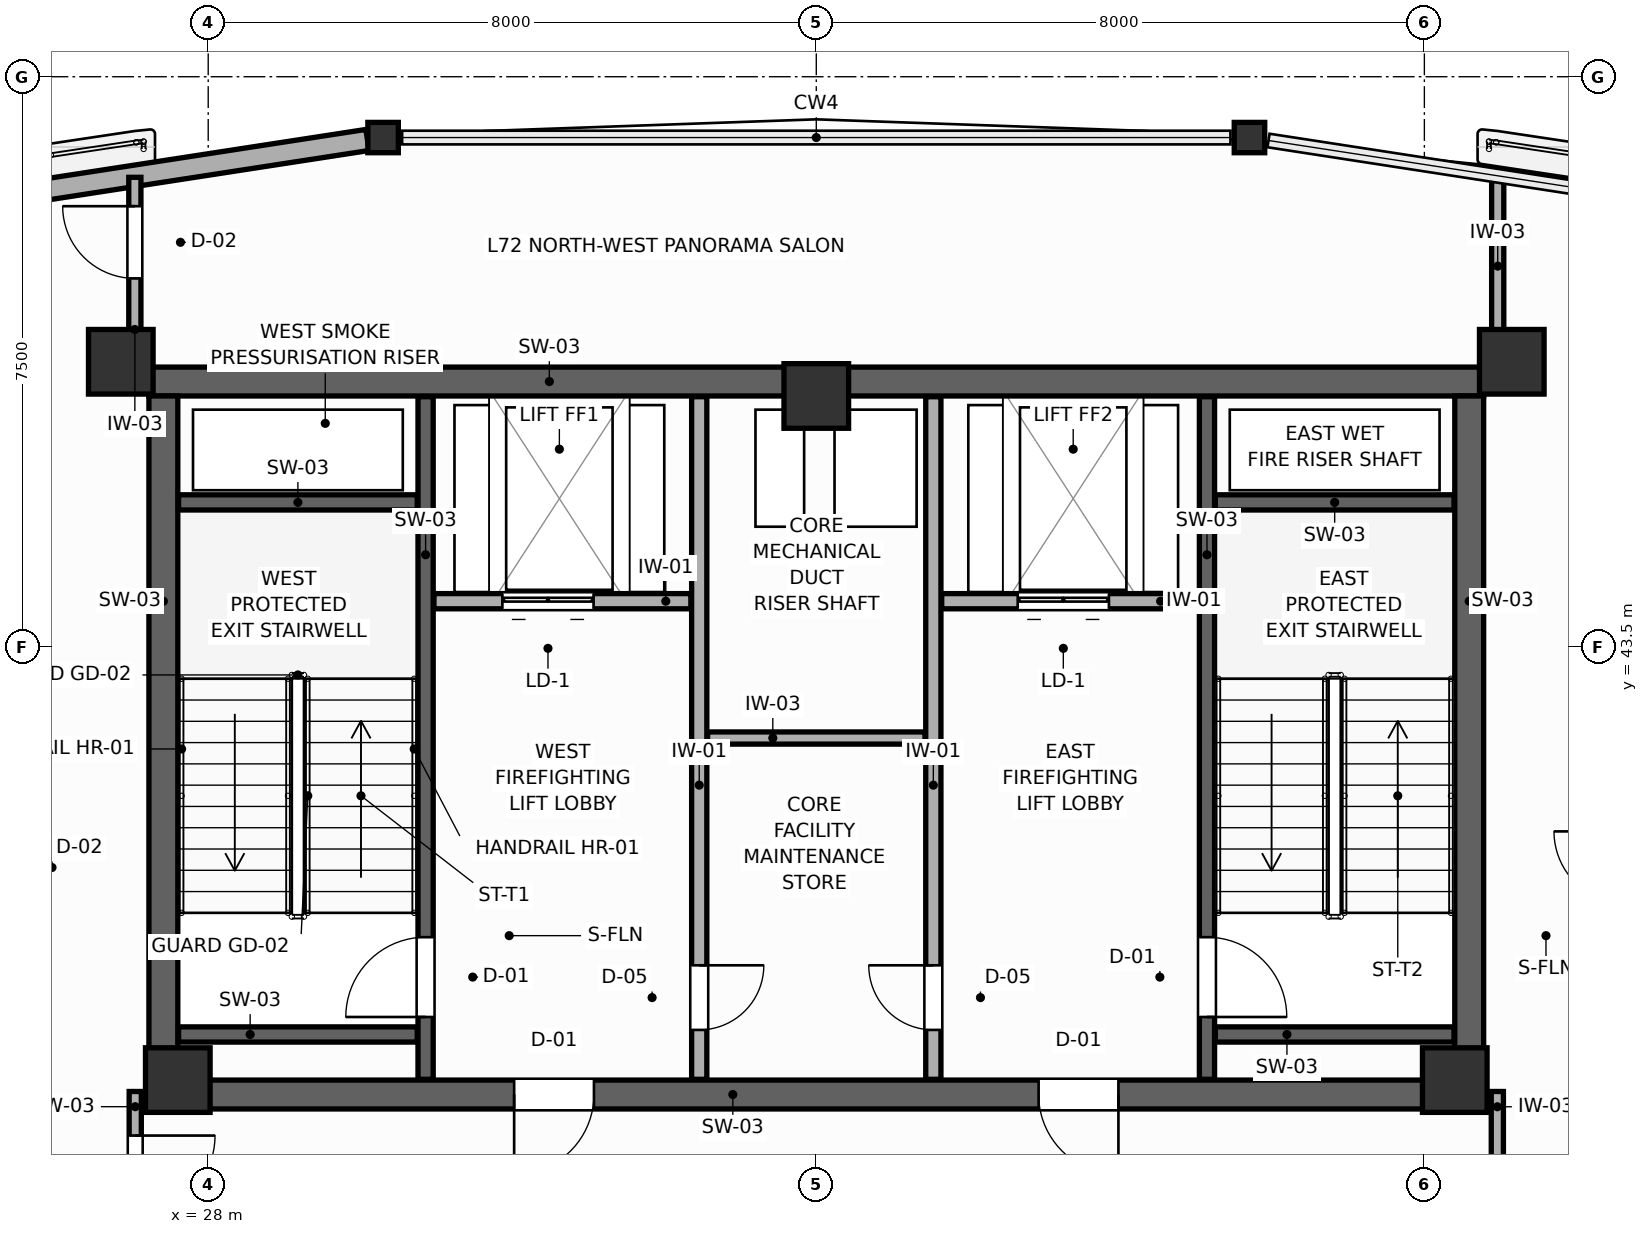
"""IFC4 building model, lengths in metres.
Left out: names, types, materials, properties, quantities, classifications, styles, units other than length and angle.
Written with IfcOpenShell. Run it as: python <this file> out.ifc"""

import sys

from ifc_helpers import new_model, si_unit, direction, frame, frame_2d, origin, origin_2d, place, context, subcontext, project, spatial, rectangle, i_section, extrude, source, transform, mapped, element, fill, save


model = new_model("IFC4")
c1 = context("Model", 3, precision=1e-05, world=origin(), true_north=direction((0.0, 1.0)))
c2 = subcontext(c1, "Body", "Model", "MODEL_VIEW")
j1 = project(units=[si_unit("LENGTHUNIT", "METRE"), si_unit("PLANEANGLEUNIT", "RADIAN")], contexts=[c1])
p1 = place(None, origin())
s1 = spatial("IfcSite", under=j1, at=p1, CompositionType="ELEMENT")
p2 = place(p1, origin())
s2 = spatial("IfcBuilding", under=s1, at=p2, CompositionType="ELEMENT")
p3 = place(p2, frame((0.0, 0.0, 275.4)))
s3 = spatial("IfcBuildingStorey", under=s2, at=p3, CompositionType="ELEMENT", Elevation=275.4)
p4 = place(p3, frame((27.22, 46.99, 0.0), z_axis=(0.0, 0.0, 1.0), x_axis=(1.0, 0.0, 0.0)))
e1 = element("IfcWall", 1, at=p4, inside=s3, PredefinedType="SHEAR", context=c2, shape_type="SweptSolid", body=[
    extrude(rectangle(XDim=17.56, YDim=0.38, at=frame_2d((8.78, 0.0))), origin(), (0.0, 0.0, 1.0), 4.2),
])
p5 = place(p3, frame((27.22, 37.61, 0.0), z_axis=(0.0, 0.0, 1.0), x_axis=(1.0, 0.0, 0.0)))
e2 = element("IfcWall", 2, at=p5, inside=s3, PredefinedType="SHEAR", context=c2, shape_type="SweptSolid", body=[
    extrude(rectangle(XDim=17.56, YDim=0.38, at=frame_2d((8.78, 0.0))), origin(), (0.0, 0.0, 1.0), 4.2),
])
p6 = place(p5, frame((4.805, 0.0, 0.0)))
e3 = element("IfcOpeningElement", 3, at=p6, cuts=e2, PredefinedType="OPENING", context=c2, shape_type="SweptSolid", body=[
    extrude(rectangle(XDim=1.05, YDim=2.1, at=frame_2d((0.525, 1.05))), frame((0.0, 0.2, 0.0), z_axis=(0.0, -1.0, 0.0), x_axis=(1.0, 0.0, 0.0)), (0.0, 0.0, 1.0), 0.4),
])
p7 = place(p5, frame((11.705, 0.0, 0.0)))
e4 = element("IfcOpeningElement", 4, at=p7, cuts=e2, PredefinedType="OPENING", context=c2, shape_type="SweptSolid", body=[
    extrude(rectangle(XDim=1.05, YDim=2.1, at=frame_2d((0.525, 1.05))), frame((0.0, 0.2, 0.0), z_axis=(0.0, -1.0, 0.0), x_axis=(1.0, 0.0, 0.0)), (0.0, 0.0, 1.0), 0.4),
])
for number, where, z_axis, x_axis in (
    (5, (27.41, 37.8, 0.0), (0.0, 0.0, 1.0), (0.0, 1.0, 0.0)),
    (6, (44.59, 37.8, 0.0), (0.0, 0.0, 1.0), (0.0, 1.0, 0.0)),
):
    element("IfcWall", number, at=place(p3, frame(where, z_axis=z_axis, x_axis=x_axis)), inside=s3, PredefinedType="SHEAR", context=c2, shape_type="SweptSolid", body=[
        extrude(rectangle(XDim=9.0, YDim=0.38, at=frame_2d((4.5, 0.0))), origin(), (0.0, 0.0, 1.0), 4.2),
    ])
m1 = source(origin(), c2, "Body", "SweptSolid", [
    extrude(rectangle(XDim=0.85, YDim=0.85, at=origin_2d()), origin(), (0.0, 0.0, 1.0), 4.2),
])
for number, where, z_axis, x_axis in (
    (7, (26.85, 47.25, 0.0), (0.0, 0.0, 1.0), (1.0, 0.0, 0.0)),
    (8, (45.15, 47.25, 0.0), (0.0, 0.0, 1.0), (1.0, 0.0, 0.0)),
    (9, (27.6, 37.8, 0.0), (0.0, 0.0, 1.0), (1.0, 0.0, 0.0)),
    (10, (44.4, 37.8, 0.0), (0.0, 0.0, 1.0), (1.0, 0.0, 0.0)),
    (11, (36.0, 46.8, 0.0), (0.0, 0.0, 1.0), (1.0, 0.0, 0.0)),
):
    element("IfcColumn", number, at=place(p3, frame(where, z_axis=z_axis, x_axis=x_axis)), inside=s3, PredefinedType="COLUMN", context=c2, shape_type="MappedRepresentation", body=[
        mapped(m1, transform((0.0, 0.0, 0.0), scale=1.0)),
    ])
m2 = source(origin(), c2, "Body", "SweptSolid", [
    extrude(i_section(OverallWidth=0.401, OverallDepth=0.399, WebThickness=0.022, FlangeThickness=0.036, FilletRadius=0.015, at=origin_2d()), origin(), (0.0, 0.0, 1.0), 4.2),
])
for number, where, z_axis, x_axis in (
    (12, (41.699, 50.2, 0.0), (0.0, 0.0, 1.0), (1.0, 0.0, 0.0)),
    (13, (30.301, 50.2, 0.0), (0.0, 0.0, 1.0), (1.0, 0.0, 0.0)),
):
    element("IfcColumn", number, at=place(p3, frame(where, z_axis=z_axis, x_axis=x_axis)), inside=s3, PredefinedType="COLUMN", context=c2, shape_type="MappedRepresentation", body=[
        mapped(m2, transform((0.0, 0.0, 0.0), scale=1.0)),
    ])
p8 = place(p3, frame((30.095, 50.168, 0.0), z_axis=(0.0, 0.0, 1.0), x_axis=(-0.988345027655, -0.152230438186, 0.0)))
e14 = element("IfcWall", 14, at=p8, inside=s3, PredefinedType="SOLIDWALL", context=c2, shape_type="SweptSolid", body=[
    extrude(rectangle(XDim=12.601, YDim=0.28, at=frame_2d((6.3, 0.0))), origin(), (0.0, 0.0, 1.0), 2.52),
])
p9 = place(p3, frame((30.86, 37.81, 0.0), z_axis=(0.0, 0.0, 1.0), x_axis=(0.0, 1.0, 0.0)))
e15 = element("IfcWall", 15, at=p9, inside=s3, PredefinedType="SHEAR", context=c2, shape_type="SweptSolid", body=[
    extrude(rectangle(XDim=8.98, YDim=0.2, at=frame_2d((4.49, 0.0))), origin(), (0.0, 0.0, 1.0), 4.2),
])
p10 = place(p9, frame((0.82, 0.0, 0.0)))
e16 = element("IfcOpeningElement", 16, at=p10, cuts=e15, PredefinedType="OPENING", context=c2, shape_type="SweptSolid", body=[
    extrude(rectangle(XDim=1.05, YDim=2.1, at=frame_2d((0.525, 1.05))), frame((0.0, 0.11, 0.0), z_axis=(0.0, -1.0, 0.0), x_axis=(1.0, 0.0, 0.0)), (0.0, 0.0, 1.0), 0.22),
])
for number, where, z_axis, x_axis in (
    (17, (27.61, 45.4, 0.0), (0.0, 0.0, 1.0), (1.0, 0.0, 0.0)),
    (18, (27.61, 38.4, 0.0), (0.0, 0.0, 1.0), (1.0, 0.0, 0.0)),
):
    element("IfcWall", number, at=place(p3, frame(where, z_axis=z_axis, x_axis=x_axis)), inside=s3, PredefinedType="SHEAR", context=c2, shape_type="SweptSolid", body=[
        extrude(rectangle(XDim=3.14, YDim=0.2, at=frame_2d((1.57, 0.0))), origin(), (0.0, 0.0, 1.0), 4.2),
    ])
p11 = place(p3, frame((41.14, 37.81, 0.0), z_axis=(0.0, 0.0, 1.0), x_axis=(0.0, 1.0, 0.0)))
e19 = element("IfcWall", 19, at=p11, inside=s3, PredefinedType="SHEAR", context=c2, shape_type="SweptSolid", body=[
    extrude(rectangle(XDim=8.98, YDim=0.2, at=frame_2d((4.49, 0.0))), origin(), (0.0, 0.0, 1.0), 4.2),
])
p12 = place(p11, frame((0.82, 0.0, 0.0)))
e20 = element("IfcOpeningElement", 20, at=p12, cuts=e19, PredefinedType="OPENING", context=c2, shape_type="SweptSolid", body=[
    extrude(rectangle(XDim=1.05, YDim=2.1, at=frame_2d((0.525, 1.05))), frame((0.0, 0.11, 0.0), z_axis=(0.0, -1.0, 0.0), x_axis=(1.0, 0.0, 0.0)), (0.0, 0.0, 1.0), 0.22),
])
for number, where, z_axis, x_axis in (
    (21, (41.25, 45.4, 0.0), (0.0, 0.0, 1.0), (1.0, 0.0, 0.0)),
    (22, (41.25, 38.4, 0.0), (0.0, 0.0, 1.0), (1.0, 0.0, 0.0)),
):
    element("IfcWall", number, at=place(p3, frame(where, z_axis=z_axis, x_axis=x_axis)), inside=s3, PredefinedType="SHEAR", context=c2, shape_type="SweptSolid", body=[
        extrude(rectangle(XDim=3.14, YDim=0.2, at=frame_2d((1.57, 0.0))), origin(), (0.0, 0.0, 1.0), 4.2),
    ])
p13 = place(p3, frame((30.97, 44.1, 0.0), z_axis=(0.0, 0.0, 1.0), x_axis=(1.0, 0.0, 0.0)))
e23 = element("IfcWall", 23, at=p13, inside=s3, PredefinedType="PARTITIONING", context=c2, shape_type="SweptSolid", body=[
    extrude(rectangle(XDim=3.38, YDim=0.2, at=frame_2d((1.69, 0.0))), origin(), (0.0, 0.0, 1.0), 3.96),
])
p14 = place(p13, frame((0.9, 0.0, 0.0)))
e24 = element("IfcOpeningElement", 24, at=p14, cuts=e23, PredefinedType="OPENING", context=c2, shape_type="SweptSolid", body=[
    extrude(rectangle(XDim=1.2, YDim=2.1, at=frame_2d((0.6, 1.05))), frame((0.0, 0.11, 0.0), z_axis=(0.0, -1.0, 0.0), x_axis=(1.0, 0.0, 0.0)), (0.0, 0.0, 1.0), 0.22),
])
p15 = place(p3, frame((37.65, 44.1, 0.0), z_axis=(0.0, 0.0, 1.0), x_axis=(1.0, 0.0, 0.0)))
e25 = element("IfcWall", 25, at=p15, inside=s3, PredefinedType="PARTITIONING", context=c2, shape_type="SweptSolid", body=[
    extrude(rectangle(XDim=3.38, YDim=0.2, at=frame_2d((1.69, 0.0))), origin(), (0.0, 0.0, 1.0), 3.96),
])
p16 = place(p15, frame((1.0, 0.0, 0.0)))
e26 = element("IfcOpeningElement", 26, at=p16, cuts=e25, PredefinedType="OPENING", context=c2, shape_type="SweptSolid", body=[
    extrude(rectangle(XDim=1.2, YDim=2.1, at=frame_2d((0.6, 1.05))), frame((0.0, 0.11, 0.0), z_axis=(0.0, -1.0, 0.0), x_axis=(1.0, 0.0, 0.0)), (0.0, 0.0, 1.0), 0.22),
])
p17 = place(p3, frame((34.46, 37.81, 0.0), z_axis=(0.0, 0.0, 1.0), x_axis=(0.0, 1.0, 0.0)))
e27 = element("IfcWall", 27, at=p17, inside=s3, PredefinedType="PARTITIONING", context=c2, shape_type="SweptSolid", body=[
    extrude(rectangle(XDim=8.98, YDim=0.2, at=frame_2d((4.49, 0.0))), origin(), (0.0, 0.0, 1.0), 3.96),
])
p18 = place(p17, frame((0.65, 0.0, 0.0)))
e28 = element("IfcOpeningElement", 28, at=p18, cuts=e27, PredefinedType="OPENING", context=c2, shape_type="SweptSolid", body=[
    extrude(rectangle(XDim=0.85, YDim=2.05, at=frame_2d((0.425, 1.025))), frame((0.0, 0.11, 0.0), z_axis=(0.0, -1.0, 0.0), x_axis=(1.0, 0.0, 0.0)), (0.0, 0.0, 1.0), 0.22),
])
p19 = place(p3, frame((37.54, 37.81, 0.0), z_axis=(0.0, 0.0, 1.0), x_axis=(0.0, 1.0, 0.0)))
e29 = element("IfcWall", 29, at=p19, inside=s3, PredefinedType="PARTITIONING", context=c2, shape_type="SweptSolid", body=[
    extrude(rectangle(XDim=8.98, YDim=0.2, at=frame_2d((4.49, 0.0))), origin(), (0.0, 0.0, 1.0), 3.96),
])
p20 = place(p19, frame((0.65, 0.0, 0.0)))
e30 = element("IfcOpeningElement", 30, at=p20, cuts=e29, PredefinedType="OPENING", context=c2, shape_type="SweptSolid", body=[
    extrude(rectangle(XDim=0.85, YDim=2.05, at=frame_2d((0.425, 1.025))), frame((0.0, 0.11, 0.0), z_axis=(0.0, -1.0, 0.0), x_axis=(1.0, 0.0, 0.0)), (0.0, 0.0, 1.0), 0.22),
])
p21 = place(p3, frame((34.57, 42.3, 0.0), z_axis=(0.0, 0.0, 1.0), x_axis=(1.0, 0.0, 0.0)))
e31 = element("IfcWall", 31, at=p21, inside=s3, PredefinedType="PARTITIONING", context=c2, shape_type="SweptSolid", body=[
    extrude(rectangle(XDim=2.86, YDim=0.16, at=frame_2d((1.43, 0.0))), origin(), (0.0, 0.0, 1.0), 3.96),
])
p22 = place(p3, frame((27.04, 35.54, 0.0), z_axis=(0.0, 0.0, 1.0), x_axis=(0.0, 1.0, 0.0)))
e32 = element("IfcWall", 32, at=p22, inside=s3, PredefinedType="PARTITIONING", context=c2, shape_type="SweptSolid", body=[
    extrude(rectangle(XDim=2.11, YDim=0.16, at=frame_2d((1.055, 0.0))), origin(), (0.0, 0.0, 1.0), 3.96),
])
p23 = place(p22, frame((0.48, 0.0, 0.0)))
e33 = element("IfcOpeningElement", 33, at=p23, cuts=e32, PredefinedType="OPENING", context=c2, shape_type="SweptSolid", body=[
    extrude(rectangle(XDim=1.05, YDim=2.1, at=frame_2d((0.525, 1.05))), frame((0.0, 0.09, 0.0), z_axis=(0.0, -1.0, 0.0), x_axis=(1.0, 0.0, 0.0)), (0.0, 0.0, 1.0), 0.18),
])
p24 = place(p3, frame((44.96, 35.0, 0.0), z_axis=(0.0, 0.0, 1.0), x_axis=(0.0, 1.0, 0.0)))
e34 = element("IfcWall", 34, at=p24, inside=s3, PredefinedType="PARTITIONING", context=c2, shape_type="SweptSolid", body=[
    extrude(rectangle(XDim=2.65, YDim=0.16, at=frame_2d((1.325, 0.0))), origin(), (0.0, 0.0, 1.0), 3.96),
])
p25 = place(p24, frame((0.75, 0.0, 0.0)))
e35 = element("IfcOpeningElement", 35, at=p25, cuts=e34, PredefinedType="OPENING", context=c2, shape_type="SweptSolid", body=[
    extrude(rectangle(XDim=1.05, YDim=2.1, at=frame_2d((0.525, 1.05))), frame((0.0, 0.09, 0.0), z_axis=(0.0, -1.0, 0.0), x_axis=(1.0, 0.0, 0.0)), (0.0, 0.0, 1.0), 0.18),
])
p26 = place(p3, frame((27.035, 47.183, 0.0), z_axis=(0.0, 0.0, 1.0), x_axis=(0.0, 1.0, 0.0)))
e36 = element("IfcWall", 36, at=p26, inside=s3, PredefinedType="PARTITIONING", context=c2, shape_type="SweptSolid", body=[
    extrude(rectangle(XDim=2.494, YDim=0.16, at=frame_2d((1.247, 0.0))), origin(), (0.0, 0.0, 1.0), 3.96),
])
p27 = place(p26, frame((1.164, 0.0, 0.0)))
e37 = element("IfcOpeningElement", 37, at=p27, cuts=e36, PredefinedType="OPENING", context=c2, shape_type="SweptSolid", body=[
    extrude(rectangle(XDim=0.95, YDim=2.05, at=frame_2d((0.475, 1.025))), frame((0.0, 0.09, 0.0), z_axis=(0.0, -1.0, 0.0), x_axis=(1.0, 0.0, 0.0)), (0.0, 0.0, 1.0), 0.18),
])
p28 = place(p3, frame((44.965, 47.34, 0.0), z_axis=(0.0, 0.0, 1.0), x_axis=(0.0, 1.0, 0.0)))
e38 = element("IfcWall", 38, at=p28, inside=s3, PredefinedType="PARTITIONING", context=c2, shape_type="SweptSolid", body=[
    extrude(rectangle(XDim=2.337, YDim=0.16, at=frame_2d((1.168, 0.0))), origin(), (0.0, 0.0, 1.0), 3.96),
])
p29 = place(p10, origin())
e39 = element("IfcDoor", 39, at=p29, inside=s3, OperationType="SINGLE_SWING_LEFT", PredefinedType="DOOR", context=c2, shape_type="SweptSolid", body=[
    extrude(rectangle(XDim=1.05, YDim=2.1, at=frame_2d((0.525, 1.05))), frame((0.0, 0.025, 0.0), z_axis=(0.0, -1.0, 0.0), x_axis=(1.0, 0.0, 0.0)), (0.0, 0.0, 1.0), 0.05),
])
fill(e16, e39)
p30 = place(p12, frame((1.05, 0.0, 0.0), z_axis=(0.0, 0.0, 1.0), x_axis=(-1.0, 0.0, 0.0)))
e40 = element("IfcDoor", 40, at=p30, inside=s3, OperationType="SINGLE_SWING_RIGHT", PredefinedType="DOOR", context=c2, shape_type="SweptSolid", body=[
    extrude(rectangle(XDim=1.05, YDim=2.1, at=frame_2d((0.525, 1.05))), frame((0.0, 0.025, 0.0), z_axis=(0.0, -1.0, 0.0), x_axis=(1.0, 0.0, 0.0)), (0.0, 0.0, 1.0), 0.05),
])
fill(e20, e40)
p31 = place(p14, origin())
e41 = element("IfcDoor", 41, at=p31, inside=s3, OperationType="DOUBLE_DOOR_SLIDING", PredefinedType="DOOR", context=c2, shape_type="SweptSolid", body=[
    extrude(rectangle(XDim=1.2, YDim=2.1, at=frame_2d((0.6, 1.05))), frame((0.0, 0.025, 0.0), z_axis=(0.0, -1.0, 0.0), x_axis=(1.0, 0.0, 0.0)), (0.0, 0.0, 1.0), 0.05),
])
fill(e24, e41)
p32 = place(p16, origin())
e42 = element("IfcDoor", 42, at=p32, inside=s3, OperationType="DOUBLE_DOOR_SLIDING", PredefinedType="DOOR", context=c2, shape_type="SweptSolid", body=[
    extrude(rectangle(XDim=1.2, YDim=2.1, at=frame_2d((0.6, 1.05))), frame((0.0, 0.025, 0.0), z_axis=(0.0, -1.0, 0.0), x_axis=(1.0, 0.0, 0.0)), (0.0, 0.0, 1.0), 0.05),
])
fill(e26, e42)
p33 = place(p18, frame((0.85, 0.0, 0.0), z_axis=(0.0, 0.0, 1.0), x_axis=(-1.0, 0.0, 0.0)))
e43 = element("IfcDoor", 43, at=p33, inside=s3, OperationType="SINGLE_SWING_LEFT", PredefinedType="DOOR", context=c2, shape_type="SweptSolid", body=[
    extrude(rectangle(XDim=0.85, YDim=2.05, at=frame_2d((0.425, 1.025))), frame((0.0, 0.025, 0.0), z_axis=(0.0, -1.0, 0.0), x_axis=(1.0, 0.0, 0.0)), (0.0, 0.0, 1.0), 0.05),
])
fill(e28, e43)
p34 = place(p20, origin())
e44 = element("IfcDoor", 44, at=p34, inside=s3, OperationType="SINGLE_SWING_RIGHT", PredefinedType="DOOR", context=c2, shape_type="SweptSolid", body=[
    extrude(rectangle(XDim=0.85, YDim=2.05, at=frame_2d((0.425, 1.025))), frame((0.0, 0.025, 0.0), z_axis=(0.0, -1.0, 0.0), x_axis=(1.0, 0.0, 0.0)), (0.0, 0.0, 1.0), 0.05),
])
fill(e30, e44)
p35 = place(p23, frame((1.05, 0.0, 0.0), z_axis=(0.0, 0.0, 1.0), x_axis=(-1.0, 0.0, 0.0)))
e45 = element("IfcDoor", 45, at=p35, inside=s3, OperationType="SINGLE_SWING_LEFT", PredefinedType="DOOR", context=c2, shape_type="SweptSolid", body=[
    extrude(rectangle(XDim=1.05, YDim=2.1, at=frame_2d((0.525, 1.05))), frame((0.0, 0.025, 0.0), z_axis=(0.0, -1.0, 0.0), x_axis=(1.0, 0.0, 0.0)), (0.0, 0.0, 1.0), 0.05),
])
fill(e33, e45)
p36 = place(p27, origin())
e46 = element("IfcDoor", 46, at=p36, inside=s3, OperationType="SINGLE_SWING_RIGHT", PredefinedType="DOOR", context=c2, shape_type="SweptSolid", body=[
    extrude(rectangle(XDim=0.95, YDim=2.05, at=frame_2d((0.475, 1.025))), frame((0.0, 0.025, 0.0), z_axis=(0.0, -1.0, 0.0), x_axis=(1.0, 0.0, 0.0)), (0.0, 0.0, 1.0), 0.05),
])
fill(e37, e46)
p37 = place(p6, frame((1.05, 0.0, 0.0), z_axis=(0.0, 0.0, 1.0), x_axis=(-1.0, 0.0, 0.0)))
e47 = element("IfcDoor", 47, at=p37, inside=s3, OperationType="SINGLE_SWING_RIGHT", PredefinedType="DOOR", context=c2, shape_type="SweptSolid", body=[
    extrude(rectangle(XDim=1.05, YDim=2.1, at=frame_2d((0.525, 1.05))), frame((0.0, 0.025, 0.0), z_axis=(0.0, -1.0, 0.0), x_axis=(1.0, 0.0, 0.0)), (0.0, 0.0, 1.0), 0.05),
])
fill(e3, e47)
p38 = place(p7, frame((1.05, 0.0, 0.0), z_axis=(0.0, 0.0, 1.0), x_axis=(-1.0, 0.0, 0.0)))
e48 = element("IfcDoor", 48, at=p38, inside=s3, OperationType="SINGLE_SWING_LEFT", PredefinedType="DOOR", context=c2, shape_type="SweptSolid", body=[
    extrude(rectangle(XDim=1.05, YDim=2.1, at=frame_2d((0.525, 1.05))), frame((0.0, 0.025, 0.0), z_axis=(0.0, -1.0, 0.0), x_axis=(1.0, 0.0, 0.0)), (0.0, 0.0, 1.0), 0.05),
])
fill(e4, e48)
save(model, sys.argv[1])
